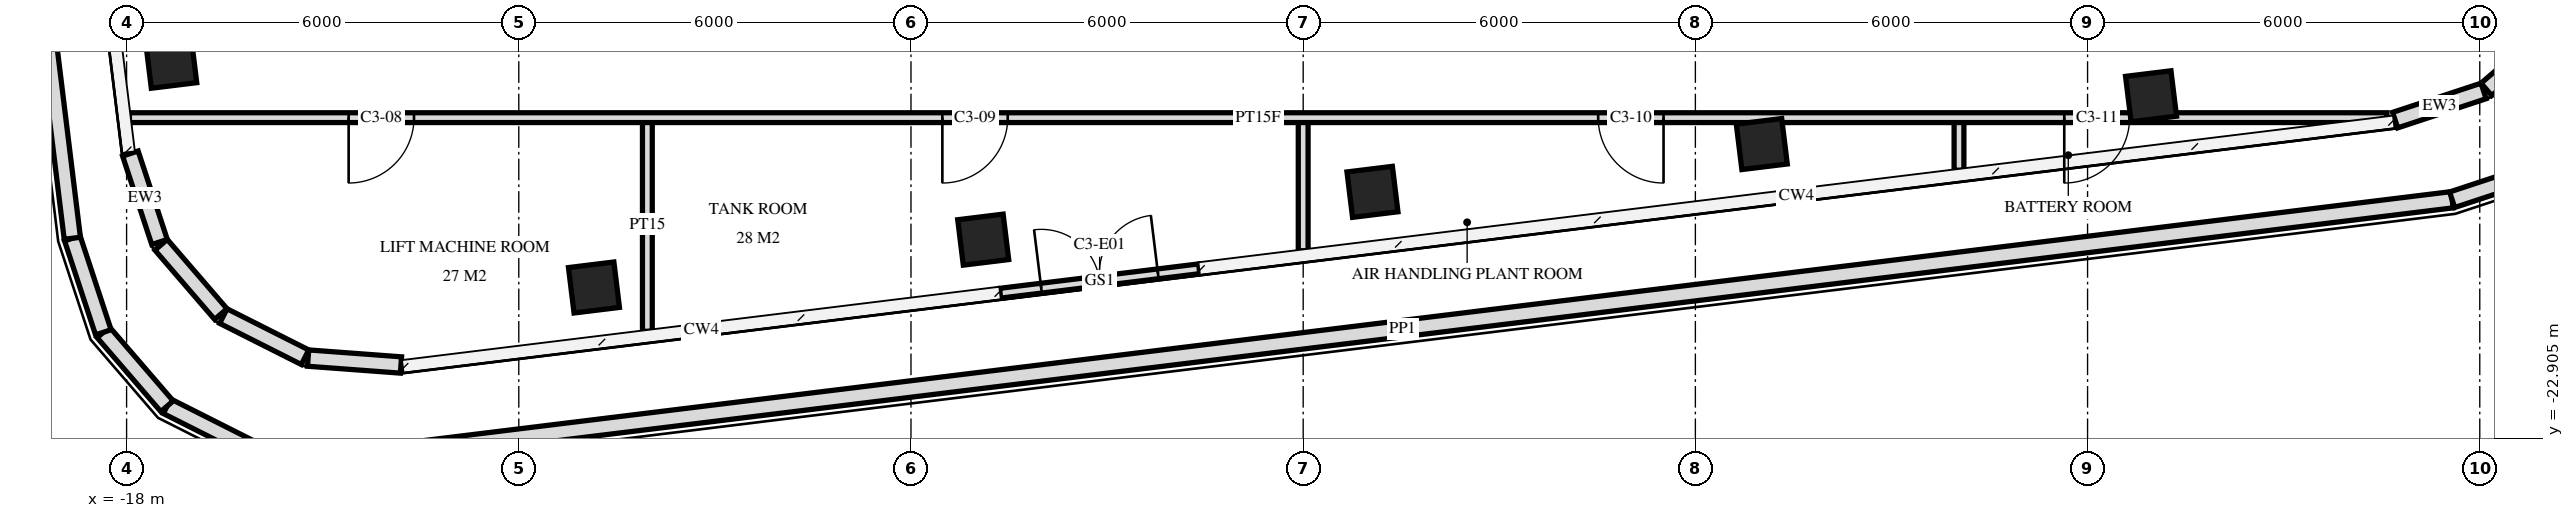
"""IFC4 building model, lengths in metres.
Left out: names, types, materials, properties, quantities, classifications, styles, units other than length and angle.
Written with IfcOpenShell. Run it as: python <this file> out.ifc"""

import sys

from ifc_helpers import new_model, si_unit, direction, frame, frame_2d, origin, origin_2d, place, context, subcontext, project, spatial, rectangle, extrude, element, fill, save


model = new_model("IFC4")
c1 = context("Model", 3, precision=1e-05, world=origin(), true_north=direction((0.0, 1.0)))
c2 = subcontext(c1, "Body", "Model", "MODEL_VIEW")
j1 = project(units=[si_unit("LENGTHUNIT", "METRE"), si_unit("PLANEANGLEUNIT", "RADIAN")], contexts=[c1])
p1 = place(None, origin())
s1 = spatial("IfcSite", under=j1, at=p1, CompositionType="ELEMENT")
p2 = place(p1, origin())
s2 = spatial("IfcBuilding", under=s1, at=p2, CompositionType="ELEMENT")
p3 = place(p2, frame((0.0, 0.0, 353.8)))
s3 = spatial("IfcBuildingStorey", under=s2, at=p3, CompositionType="ELEMENT", Elevation=353.8)
for number, where, z_axis, x_axis in (
    (1, (-17.317, -17.16, 0.0), (0.0, 0.0, 1.0), (-0.122, 0.993, 0.0)),
    (2, (-10.85, -20.598, 0.0), (0.0, 0.0, 1.0), (0.993, 0.122, 0.0)),
    (3, (-4.895, -19.866, 0.0), (0.0, 0.0, 1.0), (0.993, 0.122, 0.0)),
    (4, (1.06, -19.135, 0.0), (0.0, 0.0, 1.0), (0.993, 0.122, 0.0)),
    (5, (7.016, -18.404, 0.0), (0.0, 0.0, 1.0), (0.993, 0.122, 0.0)),
    (6, (12.971, -17.673, 0.0), (0.0, 0.0, 1.0), (0.993, 0.122, 0.0)),
):
    element("IfcColumn", number, at=place(p3, frame(where, z_axis=z_axis, x_axis=x_axis)), inside=s3, PredefinedType="COLUMN", context=c2, shape_type="SweptSolid", body=[
        extrude(rectangle(XDim=0.7, YDim=0.7, at=origin_2d()), origin(), (0.0, 0.0, 1.0), 3.6),
    ])
p4 = place(p3, frame((-17.942, -18.549, 0.0), z_axis=(0.0, 0.0, 1.0), x_axis=(0.313193586641, -0.949689305661, 0.0)))
e7 = element("IfcWall", 7, at=p4, inside=s3, PredefinedType="SOLIDWALL", context=c2, shape_type="SweptSolid", body=[
    extrude(rectangle(XDim=1.425, YDim=0.25, at=frame_2d((0.712, 0.0))), origin(), (0.0, 0.0, 1.0), 3.32),
])
for number, where, z_axis, x_axis in (
    (8, (-17.472, -19.945, 0.0), (0.0, 0.0, 1.0), (0.653, -0.758, 0.0)),
    (9, (-16.52, -21.035, 0.0), (0.0, 0.0, 1.0), (0.893, -0.45, 0.0)),
):
    element("IfcWall", number, at=place(p3, frame(where, z_axis=z_axis, x_axis=x_axis)), inside=s3, PredefinedType="SOLIDWALL", context=c2, shape_type="SweptSolid", body=[
        extrude(rectangle(XDim=1.4, YDim=0.25, at=frame_2d((0.7, 0.0))), origin(), (0.0, 0.0, 1.0), 3.32),
    ])
p5 = place(p3, frame((-15.223, -21.678, 0.0), z_axis=(0.0, 0.0, 1.0), x_axis=(0.997243858757, -0.07419357231, 0.0)))
e10 = element("IfcWall", 10, at=p5, inside=s3, PredefinedType="SOLIDWALL", context=c2, shape_type="SweptSolid", body=[
    extrude(rectangle(XDim=1.425, YDim=0.25, at=frame_2d((0.712, 0.0))), origin(), (0.0, 0.0, 1.0), 3.32),
])
p6 = place(p3, frame((-4.637, -20.686, 0.0), z_axis=(0.0, 0.0, 1.0), x_axis=(0.992544806081, 0.121880301612, 0.0)))
e11 = element("IfcWall", 11, at=p6, inside=s3, PredefinedType="USERDEFINED", context=c2, shape_type="SweptSolid", body=[
    extrude(rectangle(XDim=3.069, YDim=0.15, at=frame_2d((1.534, 0.0))), origin(), (0.0, 0.0, 1.0), 3.32),
])
p7 = place(p6, frame((0.635, 0.0, 0.0)))
e12 = element("IfcOpeningElement", 12, at=p7, cuts=e11, PredefinedType="OPENING", context=c2, shape_type="SweptSolid", body=[
    extrude(rectangle(XDim=1.8, YDim=2.4, at=frame_2d((0.9, 1.2))), frame((0.0, 0.085, 0.0), z_axis=(0.0, -1.0, 0.0), x_axis=(1.0, 0.0, 0.0)), (0.0, 0.0, 1.0), 0.17),
])
p8 = place(p3, frame((16.706, -18.038, 0.0), z_axis=(0.0, 0.0, 1.0), x_axis=(0.949723461674, 0.313089997199, 0.0)))
e13 = element("IfcWall", 13, at=p8, inside=s3, PredefinedType="SOLIDWALL", context=c2, shape_type="SweptSolid", body=[
    extrude(rectangle(XDim=1.425, YDim=0.25, at=frame_2d((0.712, 0.0))), origin(), (0.0, 0.0, 1.0), 3.32),
])
p9 = place(p3, frame((18.101, -17.567, 0.0), z_axis=(0.0, 0.0, 1.0), x_axis=(0.757579494449, 0.652742912325, 0.0)))
e14 = element("IfcWall", 14, at=p9, inside=s3, PredefinedType="SOLIDWALL", context=c2, shape_type="SweptSolid", body=[
    extrude(rectangle(XDim=1.4, YDim=0.25, at=frame_2d((0.7, 0.0))), origin(), (0.0, 0.0, 1.0), 3.32),
])
p10 = place(p3, frame((19.016, -18.781, 0.0), z_axis=(0.0, 0.0, 1.0), x_axis=(-0.949661734295, -0.313277178257, 0.0)))
e15 = element("IfcWall", 15, at=p10, inside=s3, PredefinedType="PARAPET", context=c2, shape_type="SweptSolid", body=[
    extrude(rectangle(XDim=1.515, YDim=0.25, at=frame_2d((0.757, 0.0))), origin(), (0.0, 0.0, 1.0), 1.1),
])
p11 = place(p3, frame((17.577, -19.256, 0.0), z_axis=(0.0, 0.0, 1.0), x_axis=(-0.992546786004, -0.121864176827, 0.0)))
e16 = element("IfcWall", 16, at=p11, inside=s3, PredefinedType="PARAPET", context=c2, shape_type="SweptSolid", body=[
    extrude(rectangle(XDim=32.357, YDim=0.25, at=frame_2d((16.178, 0.0))), origin(), (0.0, 0.0, 1.0), 1.1),
])
p12 = place(p3, frame((-16.049, -23.086, 0.0), z_axis=(0.0, 0.0, 1.0), x_axis=(-0.892950179293, 0.450155503465, 0.0)))
e17 = element("IfcWall", 17, at=p12, inside=s3, PredefinedType="PARAPET", context=c2, shape_type="SweptSolid", body=[
    extrude(rectangle(XDim=1.492, YDim=0.25, at=frame_2d((0.746, 0.0))), origin(), (0.0, 0.0, 1.0), 1.1),
])
p13 = place(p3, frame((-17.382, -22.415, 0.0), z_axis=(0.0, 0.0, 1.0), x_axis=(-0.652742242304, 0.757580071749, 0.0)))
e18 = element("IfcWall", 18, at=p13, inside=s3, PredefinedType="PARAPET", context=c2, shape_type="SweptSolid", body=[
    extrude(rectangle(XDim=1.493, YDim=0.25, at=frame_2d((0.746, 0.0))), origin(), (0.0, 0.0, 1.0), 1.1),
])
p14 = place(p3, frame((-18.356, -21.284, 0.0), z_axis=(0.0, 0.0, 1.0), x_axis=(-0.313179765281, 0.949693863631, 0.0)))
e19 = element("IfcWall", 19, at=p14, inside=s3, PredefinedType="PARAPET", context=c2, shape_type="SweptSolid", body=[
    extrude(rectangle(XDim=1.515, YDim=0.25, at=frame_2d((0.757, 0.0))), origin(), (0.0, 0.0, 1.0), 1.1),
])
p15 = place(p3, frame((-18.83, -19.845, 0.0), z_axis=(0.0, 0.0, 1.0), x_axis=(-0.121865842614, 0.992546581478, 0.0)))
e20 = element("IfcWall", 20, at=p15, inside=s3, PredefinedType="PARAPET", context=c2, shape_type="SweptSolid", body=[
    extrude(rectangle(XDim=17.237, YDim=0.25, at=frame_2d((8.618, 0.0))), origin(), (0.0, 0.0, 1.0), 1.1),
])
p16 = place(p3, frame((10.033, -18.804, 0.0), z_axis=(0.0, 0.0, 1.0), x_axis=(0.0, 1.0, 0.0)))
e21 = element("IfcWall", 21, at=p16, inside=s3, PredefinedType="PARTITIONING", context=c2, shape_type="SweptSolid", body=[
    extrude(rectangle(XDim=0.804, YDim=0.15, at=frame_2d((0.402, 0.0))), origin(), (0.0, 0.0, 1.0), 3.32),
])
p17 = place(p3, frame((0.0, -20.036, 0.0), z_axis=(0.0, 0.0, 1.0), x_axis=(0.0, 1.0, 0.0)))
e22 = element("IfcWall", 22, at=p17, inside=s3, PredefinedType="PARTITIONING", context=c2, shape_type="SweptSolid", body=[
    extrude(rectangle(XDim=2.036, YDim=0.15, at=frame_2d((1.018, 0.0))), origin(), (0.0, 0.0, 1.0), 3.32),
])
p18 = place(p3, frame((-10.033, -21.268, 0.0), z_axis=(0.0, 0.0, 1.0), x_axis=(0.0, 1.0, 0.0)))
e23 = element("IfcWall", 23, at=p18, inside=s3, PredefinedType="PARTITIONING", context=c2, shape_type="SweptSolid", body=[
    extrude(rectangle(XDim=3.268, YDim=0.15, at=frame_2d((1.634, 0.0))), origin(), (0.0, 0.0, 1.0), 3.32),
])
p19 = place(p3, frame((-17.957, -18.0, 0.0), z_axis=(0.0, 0.0, 1.0), x_axis=(1.0, 0.0, 0.0)))
e24 = element("IfcWall", 24, at=p19, inside=s3, PredefinedType="PARTITIONING", context=c2, shape_type="SweptSolid", body=[
    extrude(rectangle(XDim=34.538, YDim=0.15, at=frame_2d((17.269, 0.0))), origin(), (0.0, 0.0, 1.0), 3.32),
])
p20 = place(p19, frame((3.354, 0.0, 0.0)))
e25 = element("IfcOpeningElement", 25, at=p20, cuts=e24, PredefinedType="OPENING", context=c2, shape_type="SweptSolid", body=[
    extrude(rectangle(XDim=1.0, YDim=2.1, at=frame_2d((0.5, 1.05))), frame((0.0, 0.085, 0.0), z_axis=(0.0, -1.0, 0.0), x_axis=(1.0, 0.0, 0.0)), (0.0, 0.0, 1.0), 0.17),
])
p21 = place(p19, frame((12.437, 0.0, 0.0)))
e26 = element("IfcOpeningElement", 26, at=p21, cuts=e24, PredefinedType="OPENING", context=c2, shape_type="SweptSolid", body=[
    extrude(rectangle(XDim=1.0, YDim=2.1, at=frame_2d((0.5, 1.05))), frame((0.0, 0.085, 0.0), z_axis=(0.0, -1.0, 0.0), x_axis=(1.0, 0.0, 0.0)), (0.0, 0.0, 1.0), 0.17),
])
p22 = place(p19, frame((22.47, 0.0, 0.0)))
e27 = element("IfcOpeningElement", 27, at=p22, cuts=e24, PredefinedType="OPENING", context=c2, shape_type="SweptSolid", body=[
    extrude(rectangle(XDim=1.0, YDim=2.1, at=frame_2d((0.5, 1.05))), frame((0.0, 0.085, 0.0), z_axis=(0.0, -1.0, 0.0), x_axis=(1.0, 0.0, 0.0)), (0.0, 0.0, 1.0), 0.17),
])
p23 = place(p19, frame((29.6, 0.0, 0.0)))
e28 = element("IfcOpeningElement", 28, at=p23, cuts=e24, PredefinedType="OPENING", context=c2, shape_type="SweptSolid", body=[
    extrude(rectangle(XDim=1.0, YDim=2.1, at=frame_2d((0.5, 1.05))), frame((0.0, 0.085, 0.0), z_axis=(0.0, -1.0, 0.0), x_axis=(1.0, 0.0, 0.0)), (0.0, 0.0, 1.0), 0.17),
])
p24 = place(p7, origin())
e29 = element("IfcDoor", 29, at=p24, inside=s3, OperationType="DOUBLE_DOOR_SINGLE_SWING", PredefinedType="DOOR", context=c2, shape_type="SweptSolid", body=[
    extrude(rectangle(XDim=1.8, YDim=2.4, at=frame_2d((0.9, 1.2))), frame((0.0, 0.025, 0.0), z_axis=(0.0, -1.0, 0.0), x_axis=(1.0, 0.0, 0.0)), (0.0, 0.0, 1.0), 0.05),
])
fill(e12, e29)
p25 = place(p20, frame((0.5, 0.0, 0.0), z_axis=(0.0, 0.0, 1.0), x_axis=(-1.0, 0.0, 0.0)))
e30 = element("IfcDoor", 30, at=p25, inside=s3, OperationType="SINGLE_SWING_LEFT", PredefinedType="DOOR", context=c2, shape_type="SweptSolid", body=[
    extrude(rectangle(XDim=1.0, YDim=2.1, at=frame_2d((0.0, 1.05))), frame((0.0, -0.025, 0.0), z_axis=(0.0, 1.0, 0.0), x_axis=(-1.0, 0.0, 0.0)), (0.0, 0.0, 1.0), 0.05),
])
fill(e25, e30)
p26 = place(p21, frame((0.5, 0.0, 0.0), z_axis=(0.0, 0.0, 1.0), x_axis=(-1.0, 0.0, 0.0)))
e31 = element("IfcDoor", 31, at=p26, inside=s3, OperationType="SINGLE_SWING_LEFT", PredefinedType="DOOR", context=c2, shape_type="SweptSolid", body=[
    extrude(rectangle(XDim=1.0, YDim=2.1, at=frame_2d((0.0, 1.05))), frame((0.0, -0.025, 0.0), z_axis=(0.0, 1.0, 0.0), x_axis=(-1.0, 0.0, 0.0)), (0.0, 0.0, 1.0), 0.05),
])
fill(e26, e31)
p27 = place(p22, frame((0.5, 0.0, 0.0), z_axis=(0.0, 0.0, 1.0), x_axis=(-1.0, 0.0, 0.0)))
e32 = element("IfcDoor", 32, at=p27, inside=s3, OperationType="SINGLE_SWING_RIGHT", PredefinedType="DOOR", context=c2, shape_type="SweptSolid", body=[
    extrude(rectangle(XDim=1.0, YDim=2.1, at=frame_2d((0.0, 1.05))), frame((0.0, -0.025, 0.0), z_axis=(0.0, 1.0, 0.0), x_axis=(-1.0, 0.0, 0.0)), (0.0, 0.0, 1.0), 0.05),
])
fill(e27, e32)
p28 = place(p23, frame((0.5, 0.0, 0.0), z_axis=(0.0, 0.0, 1.0), x_axis=(-1.0, 0.0, 0.0)))
e33 = element("IfcDoor", 33, at=p28, inside=s3, OperationType="SINGLE_SWING_LEFT", PredefinedType="DOOR", context=c2, shape_type="SweptSolid", body=[
    extrude(rectangle(XDim=1.0, YDim=2.1, at=frame_2d((0.0, 1.05))), frame((0.0, -0.025, 0.0), z_axis=(0.0, 1.0, 0.0), x_axis=(-1.0, 0.0, 0.0)), (0.0, 0.0, 1.0), 0.05),
])
fill(e28, e33)
save(model, sys.argv[1])
